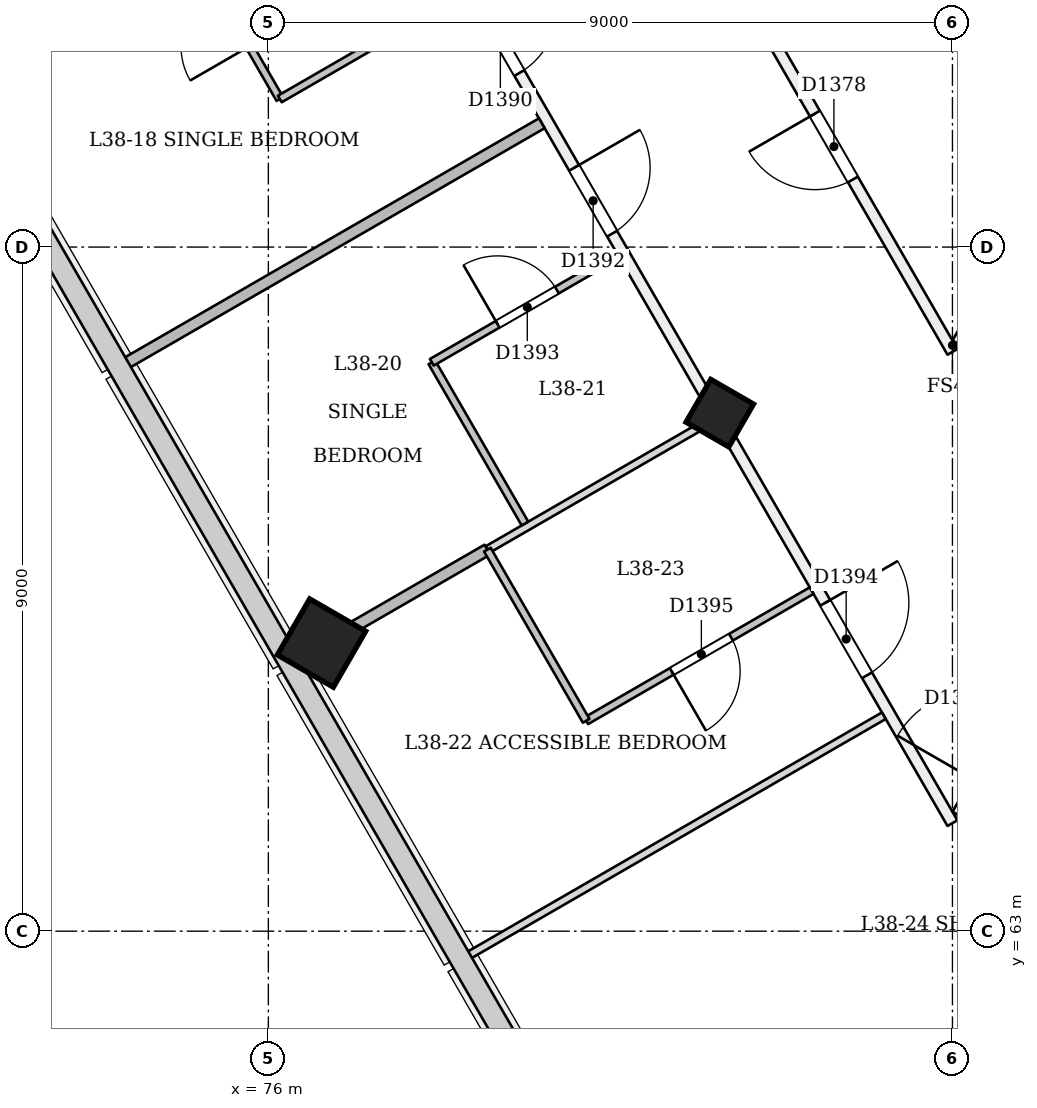
"""IFC4 building model, lengths in metres.
Left out: names, types, materials, properties, quantities, classifications, styles, units other than length and angle.
Written with IfcOpenShell. Run it as: python <this file> out.ifc"""

import sys

from ifc_helpers import new_model, si_unit, direction, frame, frame_2d, origin, origin_2d, place, context, subcontext, project, spatial, rectangle, extrude, element, fill, save


model = new_model("IFC4")
c1 = context("Model", 3, precision=1e-05, world=origin(), true_north=direction((0.0, 1.0)))
c2 = subcontext(c1, "Body", "Model", "MODEL_VIEW")
j1 = project(units=[si_unit("LENGTHUNIT", "METRE"), si_unit("PLANEANGLEUNIT", "RADIAN")], contexts=[c1])
p1 = place(None, origin())
s1 = spatial("IfcSite", under=j1, at=p1, CompositionType="ELEMENT")
p2 = place(p1, origin())
s2 = spatial("IfcBuilding", under=s1, at=p2, CompositionType="ELEMENT")
p3 = place(p2, frame((0.0, 0.0, 149.4)))
s3 = spatial("IfcBuildingStorey", under=s2, at=p3, CompositionType="ELEMENT", Elevation=149.4)
p4 = place(p3, frame((81.912, 69.769, -0.02), z_axis=(0.022222910879, 0.038415824599, 0.999014697916), x_axis=(-0.866022882898, -0.498524966963, 0.038434666793)))
e1 = element("IfcColumn", 1, at=p4, inside=s3, PredefinedType="COLUMN", context=c2, shape_type="SweptSolid", body=[
    extrude(rectangle(XDim=0.65, YDim=0.65, at=origin_2d()), origin(), (0.0, 0.0, 1.0), 3.604),
])
p5 = place(p3, frame((76.672, 66.743, -0.026), z_axis=(0.022155133694, 0.038483534979, 0.999013597298), x_axis=(-0.864981237277, -0.500328478352, 0.03845611667)))
e2 = element("IfcColumn", 2, at=p5, inside=s3, PredefinedType="COLUMN", context=c2, shape_type="SweptSolid", body=[
    extrude(rectangle(XDim=0.85, YDim=0.85, at=origin_2d()), origin(), (0.0, 0.0, 1.0), 3.604),
])
p6 = place(p3, frame((96.304, 90.2, 0.0), z_axis=(0.0, 0.0, 1.0), x_axis=(-0.500004509943, -0.866022799952, 0.0)))
e3 = element("IfcWall", 3, at=p6, inside=s3, PredefinedType="PARTITIONING", context=c2, shape_type="SweptSolid", body=[
    extrude(rectangle(XDim=22.478, YDim=0.15, at=frame_2d((11.239, 0.0))), origin(), (0.0, 0.0, 1.0), 3.15),
])
p7 = place(p6, frame((10.96, 0.0, 0.0)))
e4 = element("IfcOpeningElement", 4, at=p7, cuts=e3, PredefinedType="OPENING", context=c2, shape_type="SweptSolid", body=[
    extrude(rectangle(XDim=1.0, YDim=2.1, at=frame_2d((0.5, 1.05))), frame((0.0, 0.085, 0.0), z_axis=(0.0, -1.0, 0.0), x_axis=(1.0, 0.0, 0.0)), (0.0, 0.0, 1.0), 0.171),
])
p8 = place(p6, frame((5.447, 0.0, 0.0)))
e5 = element("IfcOpeningElement", 5, at=p8, cuts=e3, PredefinedType="OPENING", context=c2, shape_type="SweptSolid", body=[
    extrude(rectangle(XDim=1.0, YDim=2.1, at=frame_2d((0.5, 1.05))), frame((0.0, 0.085, 0.0), z_axis=(0.0, -1.0, 0.0), x_axis=(1.0, 0.0, 0.0)), (0.0, 0.0, 1.0), 0.171),
])
p9 = place(p3, frame((85.0, 70.621, 0.0), z_axis=(0.0, 0.0, 1.0), x_axis=(-0.500003200507, 0.866023555963, 0.0)))
e6 = element("IfcWall", 6, at=p9, inside=s3, PredefinedType="PARTITIONING", context=c2, shape_type="SweptSolid", body=[
    extrude(rectangle(XDim=22.608, YDim=0.15, at=frame_2d((11.304, 0.0))), origin(), (0.0, 0.0, 1.0), 3.15),
])
p10 = place(p9, frame((12.79, 0.0, 0.0)))
e7 = element("IfcOpeningElement", 7, at=p10, cuts=e6, PredefinedType="OPENING", context=c2, shape_type="SweptSolid", body=[
    extrude(rectangle(XDim=0.9, YDim=2.1, at=frame_2d((0.45, 1.05))), frame((0.0, 0.085, 0.0), z_axis=(0.0, -1.0, 0.0), x_axis=(1.0, 0.0, 0.0)), (0.0, 0.0, 1.0), 0.171),
])
p11 = place(p9, frame((19.298, 0.0, 0.0)))
e8 = element("IfcOpeningElement", 8, at=p11, cuts=e6, PredefinedType="OPENING", context=c2, shape_type="SweptSolid", body=[
    extrude(rectangle(XDim=0.9, YDim=2.1, at=frame_2d((0.45, 1.05))), frame((0.0, 0.085, 0.0), z_axis=(0.0, -1.0, 0.0), x_axis=(1.0, 0.0, 0.0)), (0.0, 0.0, 1.0), 0.171),
])
p12 = place(p9, frame((2.619, 0.0, 0.0)))
e9 = element("IfcOpeningElement", 9, at=p12, cuts=e6, PredefinedType="OPENING", context=c2, shape_type="SweptSolid", body=[
    extrude(rectangle(XDim=1.0, YDim=2.1, at=frame_2d((0.5, 1.05))), frame((0.0, 0.085, 0.0), z_axis=(0.0, -1.0, 0.0), x_axis=(1.0, 0.0, 0.0)), (0.0, 0.0, 1.0), 0.171),
])
p13 = place(p9, frame((16.21, 0.0, 0.0)))
e10 = element("IfcOpeningElement", 10, at=p13, cuts=e6, PredefinedType="OPENING", context=c2, shape_type="SweptSolid", body=[
    extrude(rectangle(XDim=1.0, YDim=2.1, at=frame_2d((0.5, 1.05))), frame((0.0, 0.085, 0.0), z_axis=(0.0, -1.0, 0.0), x_axis=(1.0, 0.0, 0.0)), (0.0, 0.0, 1.0), 0.171),
])
p14 = place(p9, frame((9.246, 0.0, 0.0)))
e11 = element("IfcOpeningElement", 11, at=p14, cuts=e6, PredefinedType="OPENING", context=c2, shape_type="SweptSolid", body=[
    extrude(rectangle(XDim=1.0, YDim=2.1, at=frame_2d((0.5, 1.05))), frame((0.0, 0.085, 0.0), z_axis=(0.0, -1.0, 0.0), x_axis=(1.0, 0.0, 0.0)), (0.0, 0.0, 1.0), 0.171),
])
p15 = place(p9, frame((5.892, 0.0, 0.0)))
e12 = element("IfcOpeningElement", 12, at=p15, cuts=e6, PredefinedType="OPENING", context=c2, shape_type="SweptSolid", body=[
    extrude(rectangle(XDim=1.0, YDim=2.1, at=frame_2d((0.5, 1.05))), frame((0.0, 0.085, 0.0), z_axis=(0.0, -1.0, 0.0), x_axis=(1.0, 0.0, 0.0)), (0.0, 0.0, 1.0), 0.171),
])
p16 = place(p3, frame((65.324, 98.5, 0.0), z_axis=(0.0, 0.0, 1.0), x_axis=(0.500001898363, -0.866024307761, 0.0)))
e13 = element("IfcWall", 13, at=p16, inside=s3, PredefinedType="PARTITIONING", context=c2, shape_type="SweptSolid", body=[
    extrude(rectangle(XDim=39.351, YDim=0.15, at=frame_2d((19.675, 0.0))), origin(), (0.0, 0.0, 1.0), 2.75),
])
p17 = place(p16, frame((0.2, 0.0, 0.0)))
e14 = element("IfcOpeningElement", 14, at=p17, cuts=e13, PredefinedType="OPENING", context=c2, shape_type="SweptSolid", body=[
    extrude(rectangle(XDim=1.2, YDim=2.1, at=frame_2d((0.6, 1.05))), frame((0.0, 0.085, 0.0), z_axis=(0.0, -1.0, 0.0), x_axis=(1.0, 0.0, 0.0)), (0.0, 0.0, 1.0), 0.171),
])
p18 = place(p16, frame((3.425, 0.0, 0.0)))
e15 = element("IfcOpeningElement", 15, at=p18, cuts=e13, PredefinedType="OPENING", context=c2, shape_type="SweptSolid", body=[
    extrude(rectangle(XDim=1.0, YDim=2.1, at=frame_2d((0.5, 1.05))), frame((0.0, 0.085, 0.0), z_axis=(0.0, -1.0, 0.0), x_axis=(1.0, 0.0, 0.0)), (0.0, 0.0, 1.0), 0.171),
])
p19 = place(p16, frame((9.004, 0.0, 0.0)))
e16 = element("IfcOpeningElement", 16, at=p19, cuts=e13, PredefinedType="OPENING", context=c2, shape_type="SweptSolid", body=[
    extrude(rectangle(XDim=1.1, YDim=2.1, at=frame_2d((0.55, 1.05))), frame((0.0, 0.085, 0.0), z_axis=(0.0, -1.0, 0.0), x_axis=(1.0, 0.0, 0.0)), (0.0, 0.0, 1.0), 0.171),
])
p20 = place(p16, frame((11.396, 0.0, 0.0)))
e17 = element("IfcOpeningElement", 17, at=p20, cuts=e13, PredefinedType="OPENING", context=c2, shape_type="SweptSolid", body=[
    extrude(rectangle(XDim=1.0, YDim=2.1, at=frame_2d((0.5, 1.05))), frame((0.0, 0.085, 0.0), z_axis=(0.0, -1.0, 0.0), x_axis=(1.0, 0.0, 0.0)), (0.0, 0.0, 1.0), 0.171),
])
p21 = place(p16, frame((17.955, 0.0, 0.0)))
e18 = element("IfcOpeningElement", 18, at=p21, cuts=e13, PredefinedType="OPENING", context=c2, shape_type="SweptSolid", body=[
    extrude(rectangle(XDim=1.0, YDim=2.1, at=frame_2d((0.5, 1.05))), frame((0.0, 0.085, 0.0), z_axis=(0.0, -1.0, 0.0), x_axis=(1.0, 0.0, 0.0)), (0.0, 0.0, 1.0), 0.171),
])
p22 = place(p16, frame((20.396, 0.0, 0.0)))
e19 = element("IfcOpeningElement", 19, at=p22, cuts=e13, PredefinedType="OPENING", context=c2, shape_type="SweptSolid", body=[
    extrude(rectangle(XDim=1.0, YDim=2.1, at=frame_2d((0.5, 1.05))), frame((0.0, 0.085, 0.0), z_axis=(0.0, -1.0, 0.0), x_axis=(1.0, 0.0, 0.0)), (0.0, 0.0, 1.0), 0.171),
])
p23 = place(p16, frame((26.955, 0.0, 0.0)))
e20 = element("IfcOpeningElement", 20, at=p23, cuts=e13, PredefinedType="OPENING", context=c2, shape_type="SweptSolid", body=[
    extrude(rectangle(XDim=1.0, YDim=2.1, at=frame_2d((0.5, 1.05))), frame((0.0, 0.085, 0.0), z_axis=(0.0, -1.0, 0.0), x_axis=(1.0, 0.0, 0.0)), (0.0, 0.0, 1.0), 0.171),
])
p24 = place(p16, frame((29.396, 0.0, 0.0)))
e21 = element("IfcOpeningElement", 21, at=p24, cuts=e13, PredefinedType="OPENING", context=c2, shape_type="SweptSolid", body=[
    extrude(rectangle(XDim=1.0, YDim=2.1, at=frame_2d((0.5, 1.05))), frame((0.0, 0.085, 0.0), z_axis=(0.0, -1.0, 0.0), x_axis=(1.0, 0.0, 0.0)), (0.0, 0.0, 1.0), 0.171),
])
p25 = place(p16, frame((36.004, 0.0, 0.0)))
e22 = element("IfcOpeningElement", 22, at=p25, cuts=e13, PredefinedType="OPENING", context=c2, shape_type="SweptSolid", body=[
    extrude(rectangle(XDim=1.1, YDim=2.1, at=frame_2d((0.55, 1.05))), frame((0.0, 0.085, 0.0), z_axis=(0.0, -1.0, 0.0), x_axis=(1.0, 0.0, 0.0)), (0.0, 0.0, 1.0), 0.171),
])
p26 = place(p3, frame((85.065, 64.534, 0.0), z_axis=(0.0, 0.0, 1.0), x_axis=(0.500002644497, 0.866023876978, 0.0)))
e23 = element("IfcWall", 23, at=p26, inside=s3, PredefinedType="PARTITIONING", context=c2, shape_type="SweptSolid", body=[
    extrude(rectangle(XDim=39.221, YDim=0.15, at=frame_2d((19.61, 0.0))), origin(), (0.0, 0.0, 1.0), 2.75),
])
p27 = place(p26, frame((0.506, 0.0, 0.0)))
e24 = element("IfcOpeningElement", 24, at=p27, cuts=e23, PredefinedType="OPENING", context=c2, shape_type="SweptSolid", body=[
    extrude(rectangle(XDim=1.2, YDim=2.1, at=frame_2d((0.6, 1.05))), frame((0.0, 0.085, 0.0), z_axis=(0.0, -1.0, 0.0), x_axis=(1.0, 0.0, 0.0)), (0.0, 0.0, 1.0), 0.171),
])
p28 = place(p26, frame((8.825, 0.0, 0.0)))
e25 = element("IfcOpeningElement", 25, at=p28, cuts=e23, PredefinedType="OPENING", context=c2, shape_type="SweptSolid", body=[
    extrude(rectangle(XDim=1.0, YDim=2.1, at=frame_2d((0.5, 1.05))), frame((0.0, 0.085, 0.0), z_axis=(0.0, -1.0, 0.0), x_axis=(1.0, 0.0, 0.0)), (0.0, 0.0, 1.0), 0.171),
])
p29 = place(p26, frame((11.266, 0.0, 0.0)))
e26 = element("IfcOpeningElement", 26, at=p29, cuts=e23, PredefinedType="OPENING", context=c2, shape_type="SweptSolid", body=[
    extrude(rectangle(XDim=1.0, YDim=2.1, at=frame_2d((0.5, 1.05))), frame((0.0, 0.085, 0.0), z_axis=(0.0, -1.0, 0.0), x_axis=(1.0, 0.0, 0.0)), (0.0, 0.0, 1.0), 0.171),
])
p30 = place(p26, frame((17.825, 0.0, 0.0)))
e27 = element("IfcOpeningElement", 27, at=p30, cuts=e23, PredefinedType="OPENING", context=c2, shape_type="SweptSolid", body=[
    extrude(rectangle(XDim=1.0, YDim=2.1, at=frame_2d((0.5, 1.05))), frame((0.0, 0.085, 0.0), z_axis=(0.0, -1.0, 0.0), x_axis=(1.0, 0.0, 0.0)), (0.0, 0.0, 1.0), 0.171),
])
p31 = place(p26, frame((20.266, 0.0, 0.0)))
e28 = element("IfcOpeningElement", 28, at=p31, cuts=e23, PredefinedType="OPENING", context=c2, shape_type="SweptSolid", body=[
    extrude(rectangle(XDim=1.0, YDim=2.1, at=frame_2d((0.5, 1.05))), frame((0.0, 0.085, 0.0), z_axis=(0.0, -1.0, 0.0), x_axis=(1.0, 0.0, 0.0)), (0.0, 0.0, 1.0), 0.171),
])
p32 = place(p26, frame((26.825, 0.0, 0.0)))
e29 = element("IfcOpeningElement", 29, at=p32, cuts=e23, PredefinedType="OPENING", context=c2, shape_type="SweptSolid", body=[
    extrude(rectangle(XDim=1.0, YDim=2.1, at=frame_2d((0.5, 1.05))), frame((0.0, 0.085, 0.0), z_axis=(0.0, -1.0, 0.0), x_axis=(1.0, 0.0, 0.0)), (0.0, 0.0, 1.0), 0.171),
])
p33 = place(p26, frame((30.296, 0.0, 0.0)))
e30 = element("IfcOpeningElement", 30, at=p33, cuts=e23, PredefinedType="OPENING", context=c2, shape_type="SweptSolid", body=[
    extrude(rectangle(XDim=1.0, YDim=2.1, at=frame_2d((0.5, 1.05))), frame((0.0, 0.085, 0.0), z_axis=(0.0, -1.0, 0.0), x_axis=(1.0, 0.0, 0.0)), (0.0, 0.0, 1.0), 0.171),
])
p34 = place(p26, frame((35.875, 0.0, 0.0)))
e31 = element("IfcOpeningElement", 31, at=p34, cuts=e23, PredefinedType="OPENING", context=c2, shape_type="SweptSolid", body=[
    extrude(rectangle(XDim=1.1, YDim=2.1, at=frame_2d((0.55, 1.05))), frame((0.0, 0.085, 0.0), z_axis=(0.0, -1.0, 0.0), x_axis=(1.0, 0.0, 0.0)), (0.0, 0.0, 1.0), 0.171),
])
p35 = place(p26, frame((37.821, 0.0, 0.0)))
e32 = element("IfcOpeningElement", 32, at=p35, cuts=e23, PredefinedType="OPENING", context=c2, shape_type="SweptSolid", body=[
    extrude(rectangle(XDim=1.2, YDim=2.1, at=frame_2d((0.6, 1.05))), frame((0.0, 0.085, 0.0), z_axis=(0.0, -1.0, 0.0), x_axis=(1.0, 0.0, 0.0)), (0.0, 0.0, 1.0), 0.171),
])
p36 = place(p3, frame((76.151, 73.948, 0.0), z_axis=(0.0, 0.0, 1.0), x_axis=(-0.500004234368, 0.866022959057, 0.0)))
e33 = element("IfcWall", 33, at=p36, inside=s3, PredefinedType="PARTITIONING", context=c2, shape_type="SweptSolid", body=[
    extrude(rectangle(XDim=5.0, YDim=0.1, at=frame_2d((2.5, 0.0))), origin(), (0.0, 0.0, 1.0), 2.75),
])
p37 = place(p36, frame((3.3, 0.0, 0.0)))
e34 = element("IfcOpeningElement", 34, at=p37, cuts=e33, PredefinedType="OPENING", context=c2, shape_type="SweptSolid", body=[
    extrude(rectangle(XDim=0.9, YDim=2.1, at=frame_2d((0.45, 1.05))), frame((0.0, 0.061, 0.0), z_axis=(0.0, -1.0, 0.0), x_axis=(1.0, 0.0, 0.0)), (0.0, 0.0, 1.0), 0.121),
])
p38 = place(p36, frame((0.8, 0.0, 0.0)))
e35 = element("IfcOpeningElement", 35, at=p38, cuts=e33, PredefinedType="OPENING", context=c2, shape_type="SweptSolid", body=[
    extrude(rectangle(XDim=0.9, YDim=2.1, at=frame_2d((0.45, 1.05))), frame((0.0, 0.061, 0.0), z_axis=(0.0, -1.0, 0.0), x_axis=(1.0, 0.0, 0.0)), (0.0, 0.0, 1.0), 0.121),
])
p39 = place(p3, frame((71.87, 74.364, 0.0), z_axis=(0.0, 0.0, 1.0), x_axis=(0.866044174857, 0.499967486139, 0.0)))
e36 = element("IfcWall", 36, at=p39, inside=s3, PredefinedType="PARTITIONING", context=c2, shape_type="SweptSolid", body=[
    extrude(rectangle(XDim=3.45, YDim=0.15, at=frame_2d((1.725, 0.0))), origin(), (0.0, 0.0, 1.0), 2.65),
])
p40 = place(p3, frame((78.597, 75.361, 0.0), z_axis=(0.0, 0.0, 1.0), x_axis=(-0.866048868473, -0.499959355765, 0.0)))
e37 = element("IfcWall", 37, at=p40, inside=s3, PredefinedType="PARTITIONING", context=c2, shape_type="SweptSolid", body=[
    extrude(rectangle(XDim=2.825, YDim=0.1, at=frame_2d((1.413, 0.0))), origin(), (0.0, 0.0, 1.0), 3.15),
])
p41 = place(p3, frame((74.102, 70.456, 0.0), z_axis=(0.0, 0.0, 1.0), x_axis=(0.866025401434, 0.500000004071, 0.0)))
e38 = element("IfcWall", 38, at=p41, inside=s3, PredefinedType="PARTITIONING", context=c2, shape_type="SweptSolid", body=[
    extrude(rectangle(XDim=6.345, YDim=0.15, at=frame_2d((3.173, 0.0))), origin(), (0.0, 0.0, 1.0), 2.65),
])
p42 = place(p3, frame((79.376, 68.363, 0.0), z_axis=(0.0, 0.0, 1.0), x_axis=(-0.499943856944, 0.866057815567, 0.0)))
e39 = element("IfcWall", 39, at=p42, inside=s3, PredefinedType="PARTITIONING", context=c2, shape_type="SweptSolid", body=[
    extrude(rectangle(XDim=2.45, YDim=0.1, at=frame_2d((1.225, 0.0))), origin(), (0.0, 0.0, 1.0), 2.75),
])
p43 = place(p3, frame((78.151, 70.484, 0.0), z_axis=(0.0, 0.0, 1.0), x_axis=(0.866048868473, 0.499959355765, 0.0)))
e40 = element("IfcWall", 40, at=p43, inside=s3, PredefinedType="PARTITIONING", context=c2, shape_type="SweptSolid", body=[
    extrude(rectangle(XDim=2.825, YDim=0.1, at=frame_2d((1.413, 0.0))), origin(), (0.0, 0.0, 1.0), 3.15),
])
p44 = place(p43, frame((1.0, 0.0, 0.0)))
e41 = element("IfcOpeningElement", 41, at=p44, cuts=e40, PredefinedType="OPENING", context=c2, shape_type="SweptSolid", body=[
    extrude(rectangle(XDim=0.9, YDim=2.1, at=frame_2d((0.45, 1.05))), frame((0.0, 0.061, 0.0), z_axis=(0.0, -1.0, 0.0), x_axis=(1.0, 0.0, 0.0)), (0.0, 0.0, 1.0), 0.121),
])
p45 = place(p3, frame((76.37, 66.569, 0.0), z_axis=(0.0, 0.0, 1.0), x_axis=(0.866032775405, 0.499987231761, 0.0)))
e42 = element("IfcWall", 42, at=p45, inside=s3, PredefinedType="PARTITIONING", context=c2, shape_type="SweptSolid", body=[
    extrude(rectangle(XDim=2.9, YDim=0.15, at=frame_2d((1.45, 0.0))), origin(), (0.0, 0.0, 1.0), 2.65),
])
p46 = place(p3, frame((78.881, 68.019, 0.0), z_axis=(0.0, 0.0, 1.0), x_axis=(0.866050272892, 0.499956922968, 0.0)))
e43 = element("IfcWall", 43, at=p46, inside=s3, PredefinedType="PARTITIONING", context=c2, shape_type="SweptSolid", body=[
    extrude(rectangle(XDim=3.425, YDim=0.1, at=frame_2d((1.712, 0.0))), origin(), (0.0, 0.0, 1.0), 2.75),
])
p47 = place(p3, frame((83.147, 67.48, 0.0), z_axis=(0.0, 0.0, 1.0), x_axis=(-0.866032454348, -0.499987787867, 0.0)))
e44 = element("IfcWall", 44, at=p47, inside=s3, PredefinedType="PARTITIONING", context=c2, shape_type="SweptSolid", body=[
    extrude(rectangle(XDim=3.425, YDim=0.1, at=frame_2d((1.712, 0.0))), origin(), (0.0, 0.0, 1.0), 3.15),
])
p48 = place(p47, frame((1.225, 0.0, 0.0)))
e45 = element("IfcOpeningElement", 45, at=p48, cuts=e44, PredefinedType="OPENING", context=c2, shape_type="SweptSolid", body=[
    extrude(rectangle(XDim=0.9, YDim=2.1, at=frame_2d((0.45, 1.05))), frame((0.0, 0.061, 0.0), z_axis=(0.0, -1.0, 0.0), x_axis=(1.0, 0.0, 0.0)), (0.0, 0.0, 1.0), 0.121),
])
p49 = place(p3, frame((80.181, 65.768, 0.0), z_axis=(0.0, 0.0, 1.0), x_axis=(-0.500006934395, 0.866021400173, 0.0)))
e46 = element("IfcWall", 46, at=p49, inside=s3, PredefinedType="PARTITIONING", context=c2, shape_type="SweptSolid", body=[
    extrude(rectangle(XDim=2.6, YDim=0.1, at=frame_2d((1.3, 0.0))), origin(), (0.0, 0.0, 1.0), 2.75),
])
p50 = place(p3, frame((78.602, 62.662, 0.0), z_axis=(0.0, 0.0, 1.0), x_axis=(0.866025401434, 0.500000004071, 0.0)))
e47 = element("IfcWall", 47, at=p50, inside=s3, PredefinedType="PARTITIONING", context=c2, shape_type="SweptSolid", body=[
    extrude(rectangle(XDim=6.345, YDim=0.1, at=frame_2d((3.173, 0.0))), origin(), (0.0, 0.0, 1.0), 2.65),
])
p51 = place(p12, origin())
e48 = element("IfcDoor", 48, at=p51, inside=s3, OperationType="SINGLE_SWING_RIGHT", PredefinedType="NOTDEFINED", context=c2, shape_type="SweptSolid", body=[
    extrude(rectangle(XDim=1.0, YDim=2.1, at=frame_2d((0.5, 1.05))), frame((0.0, 0.025, 0.0), z_axis=(0.0, -1.0, 0.0), x_axis=(1.0, 0.0, 0.0)), (0.0, 0.0, 1.0), 0.05),
])
fill(e9, e48)
p52 = place(p23, origin())
e49 = element("IfcDoor", 49, at=p52, inside=s3, OperationType="SINGLE_SWING_LEFT", PredefinedType="NOTDEFINED", context=c2, shape_type="SweptSolid", body=[
    extrude(rectangle(XDim=1.0, YDim=2.1, at=frame_2d((0.5, 1.05))), frame((0.0, 0.025, 0.0), z_axis=(0.0, -1.0, 0.0), x_axis=(1.0, 0.0, 0.0)), (0.0, 0.0, 1.0), 0.05),
])
fill(e20, e49)
p53 = place(p24, origin())
e50 = element("IfcDoor", 50, at=p53, inside=s3, OperationType="SINGLE_SWING_LEFT", PredefinedType="NOTDEFINED", context=c2, shape_type="SweptSolid", body=[
    extrude(rectangle(XDim=1.0, YDim=2.1, at=frame_2d((0.5, 1.05))), frame((0.0, 0.025, 0.0), z_axis=(0.0, -1.0, 0.0), x_axis=(1.0, 0.0, 0.0)), (0.0, 0.0, 1.0), 0.05),
])
fill(e21, e50)
p54 = place(p44, origin())
e51 = element("IfcDoor", 51, at=p54, inside=s3, OperationType="SINGLE_SWING_LEFT", PredefinedType="NOTDEFINED", context=c2, shape_type="SweptSolid", body=[
    extrude(rectangle(XDim=0.9, YDim=2.1, at=frame_2d((0.45, 1.05))), frame((0.0, 0.025, 0.0), z_axis=(0.0, -1.0, 0.0), x_axis=(1.0, 0.0, 0.0)), (0.0, 0.0, 1.0), 0.05),
])
fill(e41, e51)
p55 = place(p25, origin())
e52 = element("IfcDoor", 52, at=p55, inside=s3, OperationType="SINGLE_SWING_LEFT", PredefinedType="NOTDEFINED", context=c2, shape_type="SweptSolid", body=[
    extrude(rectangle(XDim=1.1, YDim=2.1, at=frame_2d((0.55, 1.05))), frame((0.0, 0.025, 0.0), z_axis=(0.0, -1.0, 0.0), x_axis=(1.0, 0.0, 0.0)), (0.0, 0.0, 1.0), 0.05),
])
fill(e22, e52)
p56 = place(p48, origin())
e53 = element("IfcDoor", 53, at=p56, inside=s3, OperationType="SINGLE_SWING_RIGHT", PredefinedType="NOTDEFINED", context=c2, shape_type="SweptSolid", body=[
    extrude(rectangle(XDim=0.9, YDim=2.1, at=frame_2d((0.45, 1.05))), frame((0.0, 0.025, 0.0), z_axis=(0.0, -1.0, 0.0), x_axis=(1.0, 0.0, 0.0)), (0.0, 0.0, 1.0), 0.05),
])
fill(e45, e53)
save(model, sys.argv[1])
